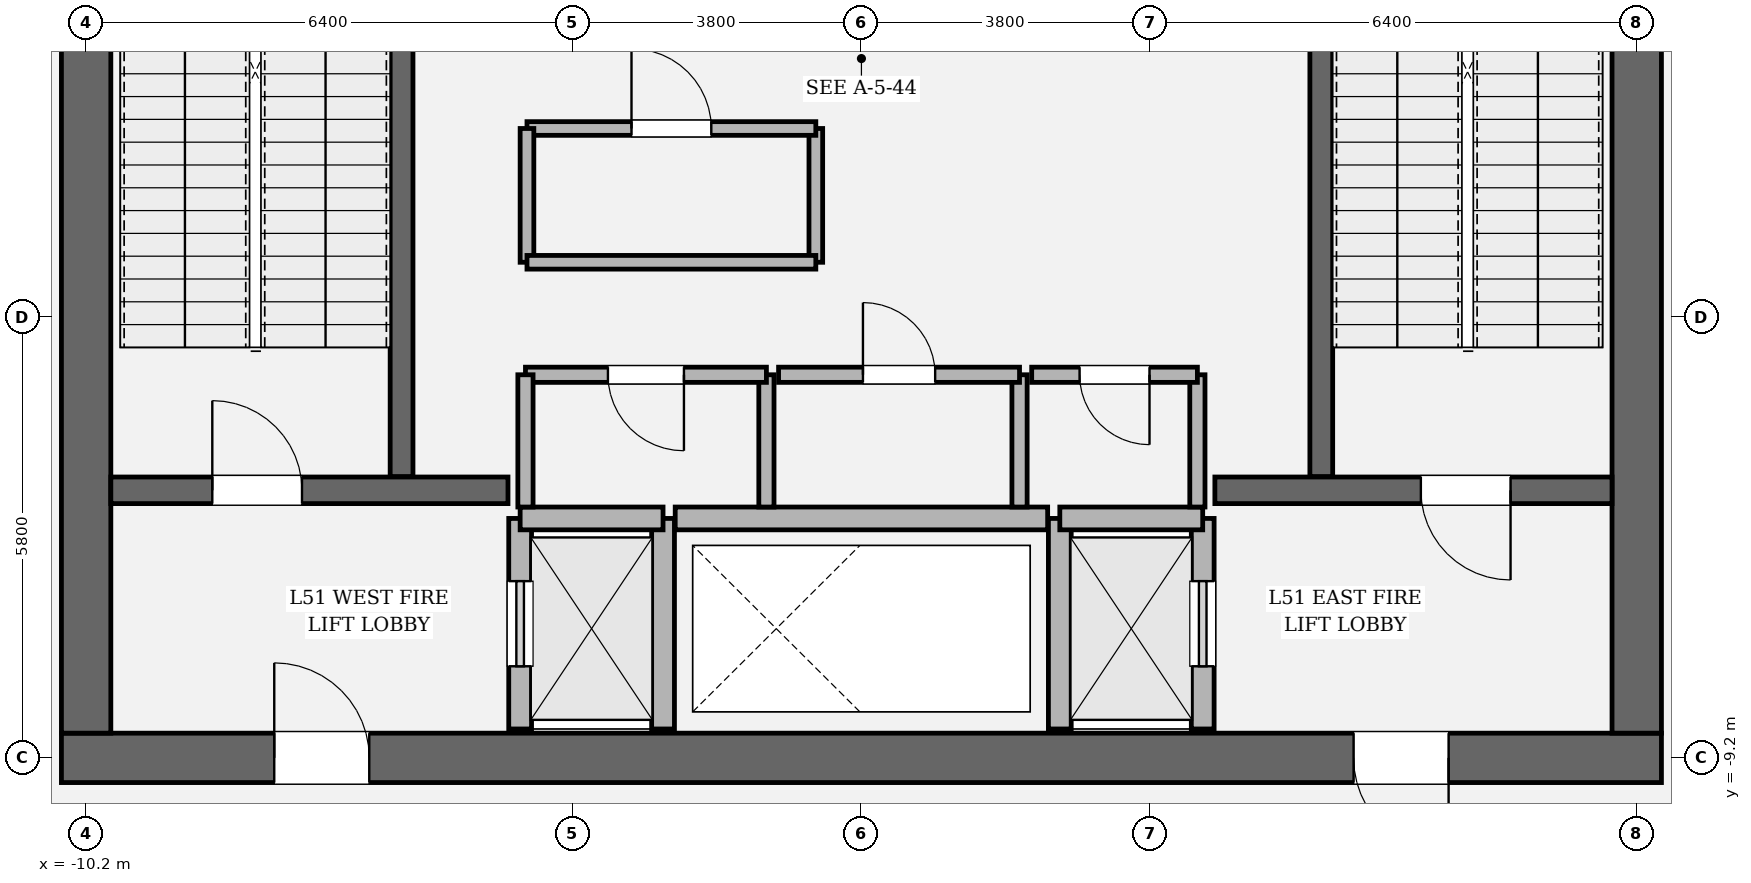
"""IFC4 building model, lengths in metres.
Left out: names, types, materials, properties, quantities, classifications, styles, units other than length and angle.
Written with IfcOpenShell. Run it as: python <this file> out.ifc"""

import sys

from ifc_helpers import new_model, si_unit, direction, frame, frame_2d, origin, place, context, subcontext, project, spatial, rectangle, extrude, element, fill, save


model = new_model("IFC4")
c1 = context("Model", 3, precision=1e-05, world=origin(), true_north=direction((0.0, 1.0)))
c2 = subcontext(c1, "Body", "Model", "MODEL_VIEW")
j1 = project(units=[si_unit("LENGTHUNIT", "METRE"), si_unit("PLANEANGLEUNIT", "RADIAN")], contexts=[c1])
p1 = place(None, origin())
s1 = spatial("IfcSite", under=j1, at=p1, CompositionType="ELEMENT")
p2 = place(p1, origin())
s2 = spatial("IfcBuilding", under=s1, at=p2, CompositionType="ELEMENT")
p3 = place(p2, frame((0.0, 0.0, 216.75)))
s3 = spatial("IfcBuildingStorey", under=s2, at=p3, CompositionType="ELEMENT", Elevation=216.75)
p4 = place(p3, frame((10.525, -9.2, 0.0), z_axis=(0.0, 0.0, 1.0), x_axis=(-1.0, 0.0, 0.0)))
e1 = element("IfcWall", 1, at=p4, inside=s3, PredefinedType="SHEAR", context=c2, shape_type="SweptSolid", body=[
    extrude(rectangle(XDim=21.05, YDim=0.65, at=frame_2d((10.525, 0.0))), origin(), (0.0, 0.0, 1.0), 4.05),
])
p5 = place(p4, frame((2.8, 0.0, 0.0)))
e2 = element("IfcOpeningElement", 2, at=p5, cuts=e1, PredefinedType="OPENING", context=c2, shape_type="SweptSolid", body=[
    extrude(rectangle(XDim=1.25, YDim=2.25, at=frame_2d((0.625, 1.125))), frame((0.0, 0.335, 0.0), z_axis=(0.0, -1.0, 0.0), x_axis=(1.0, 0.0, 0.0)), (0.0, 0.0, 1.0), 0.67),
])
p6 = place(p4, frame((17.0, 0.0, 0.0)))
e3 = element("IfcOpeningElement", 3, at=p6, cuts=e1, PredefinedType="OPENING", context=c2, shape_type="SweptSolid", body=[
    extrude(rectangle(XDim=1.25, YDim=2.25, at=frame_2d((0.625, 1.125))), frame((0.0, 0.335, 0.0), z_axis=(0.0, -1.0, 0.0), x_axis=(1.0, 0.0, 0.0)), (0.0, 0.0, 1.0), 0.67),
])
p7 = place(p3, frame((-10.2, -8.875, 0.0), z_axis=(0.0, 0.0, 1.0), x_axis=(0.0, 1.0, 0.0)))
e4 = element("IfcWall", 4, at=p7, inside=s3, PredefinedType="SHEAR", context=c2, shape_type="SweptSolid", body=[
    extrude(rectangle(XDim=17.75, YDim=0.65, at=frame_2d((8.875, 0.0))), origin(), (0.0, 0.0, 1.0), 4.05),
])
p8 = place(p7, frame((12.665, 0.0, 0.0)))
e5 = element("IfcOpeningElement", 5, at=p8, cuts=e4, PredefinedType="OPENING", context=c2, shape_type="SweptSolid", body=[
    extrude(rectangle(XDim=1.18, YDim=2.2, at=frame_2d((0.59, 1.1))), frame((0.0, 0.335, 0.0), z_axis=(0.0, -1.0, 0.0), x_axis=(1.0, 0.0, 0.0)), (0.0, 0.0, 1.0), 0.67),
])
p9 = place(p3, frame((10.2, 8.875, 0.0), z_axis=(0.0, 0.0, 1.0), x_axis=(0.0, -1.0, 0.0)))
e6 = element("IfcWall", 6, at=p9, inside=s3, PredefinedType="SHEAR", context=c2, shape_type="SweptSolid", body=[
    extrude(rectangle(XDim=17.75, YDim=0.65, at=frame_2d((8.875, 0.0))), origin(), (0.0, 0.0, 1.0), 4.05),
])
p10 = place(p9, frame((3.905, 0.0, 0.0)))
e7 = element("IfcOpeningElement", 7, at=p10, cuts=e6, PredefinedType="OPENING", context=c2, shape_type="SweptSolid", body=[
    extrude(rectangle(XDim=1.18, YDim=2.2, at=frame_2d((0.59, 1.1))), frame((0.0, 0.335, 0.0), z_axis=(0.0, -1.0, 0.0), x_axis=(1.0, 0.0, 0.0)), (0.0, 0.0, 1.0), 0.67),
])
for number, where, z_axis, x_axis in (
    (8, (-6.05, -5.5, 0.0), (0.0, 0.0, 1.0), (0.0, 1.0, 0.0)),
    (9, (6.05, 3.45, 0.0), (0.0, 0.0, 1.0), (0.0, -1.0, 0.0)),
):
    element("IfcWall", number, at=place(p3, frame(where, z_axis=z_axis, x_axis=x_axis)), inside=s3, PredefinedType="SOLIDWALL", context=c2, shape_type="SweptSolid", body=[
        extrude(rectangle(XDim=8.95, YDim=0.3, at=frame_2d((4.475, 0.0))), origin(), (0.0, 0.0, 1.0), 4.05),
    ])
p11 = place(p3, frame((-9.875, -5.68, 0.0), z_axis=(0.0, 0.0, 1.0), x_axis=(1.0, 0.0, 0.0)))
e10 = element("IfcWall", 10, at=p11, inside=s3, PredefinedType="SOLIDWALL", context=c2, shape_type="SweptSolid", body=[
    extrude(rectangle(XDim=5.225, YDim=0.35, at=frame_2d((2.613, 0.0))), origin(), (0.0, 0.0, 1.0), 4.05),
])
p12 = place(p11, frame((1.335, 0.0, 0.0)))
e11 = element("IfcOpeningElement", 11, at=p12, cuts=e10, PredefinedType="OPENING", context=c2, shape_type="SweptSolid", body=[
    extrude(rectangle(XDim=1.18, YDim=2.2, at=frame_2d((0.59, 1.1))), frame((0.0, 0.185, 0.0), z_axis=(0.0, -1.0, 0.0), x_axis=(1.0, 0.0, 0.0)), (0.0, 0.0, 1.0), 0.37),
])
p13 = place(p3, frame((4.65, -5.68, 0.0), z_axis=(0.0, 0.0, 1.0), x_axis=(1.0, 0.0, 0.0)))
e12 = element("IfcWall", 12, at=p13, inside=s3, PredefinedType="SOLIDWALL", context=c2, shape_type="SweptSolid", body=[
    extrude(rectangle(XDim=5.225, YDim=0.35, at=frame_2d((2.613, 0.0))), origin(), (0.0, 0.0, 1.0), 4.05),
])
p14 = place(p13, frame((2.71, 0.0, 0.0)))
e13 = element("IfcOpeningElement", 13, at=p14, cuts=e12, PredefinedType="OPENING", context=c2, shape_type="SweptSolid", body=[
    extrude(rectangle(XDim=1.18, YDim=2.2, at=frame_2d((0.59, 1.1))), frame((0.0, 0.185, 0.0), z_axis=(0.0, -1.0, 0.0), x_axis=(1.0, 0.0, 0.0)), (0.0, 0.0, 1.0), 0.37),
])
p15 = place(p3, frame((-4.49, -8.82, 0.0), z_axis=(0.0, 0.0, 1.0), x_axis=(0.0, 1.0, 0.0)))
e14 = element("IfcWall", 14, at=p15, inside=s3, PredefinedType="SOLIDWALL", context=c2, shape_type="SweptSolid", body=[
    extrude(rectangle(XDim=2.77, YDim=0.3, at=frame_2d((1.385, 0.0))), origin(), (0.0, 0.0, 1.0), 3.83),
])
p16 = place(p15, frame((0.825, 0.0, 0.0)))
e15 = element("IfcOpeningElement", 15, at=p16, cuts=e14, PredefinedType="OPENING", context=c2, shape_type="SweptSolid", body=[
    extrude(rectangle(XDim=1.12, YDim=2.25, at=frame_2d((0.56, 1.125))), frame((0.0, 0.16, 0.0), z_axis=(0.0, -1.0, 0.0), x_axis=(1.0, 0.0, 0.0)), (0.0, 0.0, 1.0), 0.32),
])
p17 = place(p3, frame((-2.61, -8.82, 0.0), z_axis=(0.0, 0.0, 1.0), x_axis=(0.0, 1.0, 0.0)))
e16 = element("IfcWall", 16, at=p17, inside=s3, PredefinedType="SOLIDWALL", context=c2, shape_type="SweptSolid", body=[
    extrude(rectangle(XDim=2.77, YDim=0.3, at=frame_2d((1.385, 0.0))), origin(), (0.0, 0.0, 1.0), 3.83),
])
p18 = place(p3, frame((-4.49, -6.05, 0.0), z_axis=(0.0, 0.0, 1.0), x_axis=(1.0, 0.0, 0.0)))
e17 = element("IfcWall", 17, at=p18, inside=s3, PredefinedType="SOLIDWALL", context=c2, shape_type="SweptSolid", body=[
    extrude(rectangle(XDim=1.88, YDim=0.3, at=frame_2d((0.94, 0.0))), origin(), (0.0, 0.0, 1.0), 3.83),
])
p19 = place(p3, frame((4.49, -8.82, 0.0), z_axis=(0.0, 0.0, 1.0), x_axis=(0.0, 1.0, 0.0)))
e18 = element("IfcWall", 18, at=p19, inside=s3, PredefinedType="SOLIDWALL", context=c2, shape_type="SweptSolid", body=[
    extrude(rectangle(XDim=2.77, YDim=0.3, at=frame_2d((1.385, 0.0))), origin(), (0.0, 0.0, 1.0), 3.83),
])
p20 = place(p19, frame((0.825, 0.0, 0.0)))
e19 = element("IfcOpeningElement", 19, at=p20, cuts=e18, PredefinedType="OPENING", context=c2, shape_type="SweptSolid", body=[
    extrude(rectangle(XDim=1.12, YDim=2.25, at=frame_2d((0.56, 1.125))), frame((0.0, 0.16, 0.0), z_axis=(0.0, -1.0, 0.0), x_axis=(1.0, 0.0, 0.0)), (0.0, 0.0, 1.0), 0.32),
])
p21 = place(p3, frame((2.61, -8.82, 0.0), z_axis=(0.0, 0.0, 1.0), x_axis=(0.0, 1.0, 0.0)))
e20 = element("IfcWall", 20, at=p21, inside=s3, PredefinedType="SOLIDWALL", context=c2, shape_type="SweptSolid", body=[
    extrude(rectangle(XDim=2.77, YDim=0.3, at=frame_2d((1.385, 0.0))), origin(), (0.0, 0.0, 1.0), 3.83),
])
p22 = place(p3, frame((2.61, -6.05, 0.0), z_axis=(0.0, 0.0, 1.0), x_axis=(1.0, 0.0, 0.0)))
e21 = element("IfcWall", 21, at=p22, inside=s3, PredefinedType="SOLIDWALL", context=c2, shape_type="SweptSolid", body=[
    extrude(rectangle(XDim=1.88, YDim=0.3, at=frame_2d((0.94, 0.0))), origin(), (0.0, 0.0, 1.0), 3.83),
])
p23 = place(p3, frame((-2.45, -6.05, 0.0), z_axis=(0.0, 0.0, 1.0), x_axis=(1.0, 0.0, 0.0)))
e22 = element("IfcWall", 22, at=p23, inside=s3, PredefinedType="SOLIDWALL", context=c2, shape_type="SweptSolid", body=[
    extrude(rectangle(XDim=4.9, YDim=0.3, at=frame_2d((2.45, 0.0))), origin(), (0.0, 0.0, 1.0), 3.83),
])
p24 = place(p3, frame((-1.25, -5.9, 0.0), z_axis=(0.0, 0.0, 1.0), x_axis=(0.0, 1.0, 0.0)))
e23 = element("IfcWall", 23, at=p24, inside=s3, PredefinedType="SOLIDWALL", context=c2, shape_type="SweptSolid", body=[
    extrude(rectangle(XDim=1.74, YDim=0.2, at=frame_2d((0.87, 0.0))), origin(), (0.0, 0.0, 1.0), 3.83),
])
p25 = place(p3, frame((-1.25, -4.16, 0.0), z_axis=(0.0, 0.0, 1.0), x_axis=(-1.0, 0.0, 0.0)))
e24 = element("IfcWall", 24, at=p25, inside=s3, PredefinedType="SOLIDWALL", context=c2, shape_type="SweptSolid", body=[
    extrude(rectangle(XDim=3.17, YDim=0.2, at=frame_2d((1.585, 0.0))), origin(), (0.0, 0.0, 1.0), 3.83),
])
p26 = place(p25, frame((1.085, 0.0, 0.0)))
e25 = element("IfcOpeningElement", 25, at=p26, cuts=e24, PredefinedType="OPENING", context=c2, shape_type="SweptSolid", body=[
    extrude(rectangle(XDim=1.0, YDim=2.15, at=frame_2d((0.5, 1.075))), frame((0.0, 0.11, 0.0), z_axis=(0.0, -1.0, 0.0), x_axis=(1.0, 0.0, 0.0)), (0.0, 0.0, 1.0), 0.22),
])
for number, where, z_axis, x_axis in (
    (26, (-4.42, -4.16, 0.0), (0.0, 0.0, 1.0), (0.0, -1.0, 0.0)),
    (27, (2.08, -5.9, 0.0), (0.0, 0.0, 1.0), (0.0, 1.0, 0.0)),
):
    element("IfcWall", number, at=place(p3, frame(where, z_axis=z_axis, x_axis=x_axis)), inside=s3, PredefinedType="SOLIDWALL", context=c2, shape_type="SweptSolid", body=[
        extrude(rectangle(XDim=1.74, YDim=0.2, at=frame_2d((0.87, 0.0))), origin(), (0.0, 0.0, 1.0), 3.83),
    ])
p27 = place(p3, frame((2.08, -4.16, 0.0), z_axis=(0.0, 0.0, 1.0), x_axis=(-1.0, 0.0, 0.0)))
e28 = element("IfcWall", 28, at=p27, inside=s3, PredefinedType="SOLIDWALL", context=c2, shape_type="SweptSolid", body=[
    extrude(rectangle(XDim=3.17, YDim=0.2, at=frame_2d((1.585, 0.0))), origin(), (0.0, 0.0, 1.0), 3.83),
])
p28 = place(p27, frame((1.11, 0.0, 0.0)))
e29 = element("IfcOpeningElement", 29, at=p28, cuts=e28, PredefinedType="OPENING", context=c2, shape_type="SweptSolid", body=[
    extrude(rectangle(XDim=0.95, YDim=2.15, at=frame_2d((0.475, 1.075))), frame((0.0, 0.11, 0.0), z_axis=(0.0, -1.0, 0.0), x_axis=(1.0, 0.0, 0.0)), (0.0, 0.0, 1.0), 0.22),
])
p29 = place(p3, frame((4.42, -5.9, 0.0), z_axis=(0.0, 0.0, 1.0), x_axis=(0.0, 1.0, 0.0)))
e30 = element("IfcWall", 30, at=p29, inside=s3, PredefinedType="SOLIDWALL", context=c2, shape_type="SweptSolid", body=[
    extrude(rectangle(XDim=1.74, YDim=0.2, at=frame_2d((0.87, 0.0))), origin(), (0.0, 0.0, 1.0), 3.83),
])
p30 = place(p3, frame((4.42, -4.16, 0.0), z_axis=(0.0, 0.0, 1.0), x_axis=(-1.0, 0.0, 0.0)))
e31 = element("IfcWall", 31, at=p30, inside=s3, PredefinedType="SOLIDWALL", context=c2, shape_type="SweptSolid", body=[
    extrude(rectangle(XDim=2.18, YDim=0.2, at=frame_2d((1.09, 0.0))), origin(), (0.0, 0.0, 1.0), 3.83),
])
p31 = place(p30, frame((0.63, 0.0, 0.0)))
e32 = element("IfcOpeningElement", 32, at=p31, cuts=e31, PredefinedType="OPENING", context=c2, shape_type="SweptSolid", body=[
    extrude(rectangle(XDim=0.92, YDim=2.1, at=frame_2d((0.46, 1.05))), frame((0.0, 0.11, 0.0), z_axis=(0.0, -1.0, 0.0), x_axis=(1.0, 0.0, 0.0)), (0.0, 0.0, 1.0), 0.22),
])
p32 = place(p3, frame((-0.6, -2.68, 0.0), z_axis=(0.0, 0.0, 1.0), x_axis=(0.0, 1.0, 0.0)))
e33 = element("IfcWall", 33, at=p32, inside=s3, PredefinedType="PARTITIONING", context=c2, shape_type="SweptSolid", body=[
    extrude(rectangle(XDim=1.76, YDim=0.18, at=frame_2d((0.88, 0.0))), origin(), (0.0, 0.0, 1.0), 3.83),
])
p33 = place(p3, frame((-0.6, -0.92, 0.0), z_axis=(0.0, 0.0, 1.0), x_axis=(-1.0, 0.0, 0.0)))
e34 = element("IfcWall", 34, at=p33, inside=s3, PredefinedType="PARTITIONING", context=c2, shape_type="SweptSolid", body=[
    extrude(rectangle(XDim=3.8, YDim=0.18, at=frame_2d((1.9, 0.0))), origin(), (0.0, 0.0, 1.0), 3.83),
])
p34 = place(p33, frame((1.375, 0.0, 0.0)))
e35 = element("IfcOpeningElement", 35, at=p34, cuts=e34, PredefinedType="OPENING", context=c2, shape_type="SweptSolid", body=[
    extrude(rectangle(XDim=1.05, YDim=2.2, at=frame_2d((0.525, 1.1))), frame((0.0, 0.1, 0.0), z_axis=(0.0, -1.0, 0.0), x_axis=(1.0, 0.0, 0.0)), (0.0, 0.0, 1.0), 0.2),
])
p35 = place(p3, frame((-4.4, -0.92, 0.0), z_axis=(0.0, 0.0, 1.0), x_axis=(0.0, -1.0, 0.0)))
e36 = element("IfcWall", 36, at=p35, inside=s3, PredefinedType="PARTITIONING", context=c2, shape_type="SweptSolid", body=[
    extrude(rectangle(XDim=1.76, YDim=0.18, at=frame_2d((0.88, 0.0))), origin(), (0.0, 0.0, 1.0), 3.83),
])
p36 = place(p3, frame((-4.4, -2.68, 0.0), z_axis=(0.0, 0.0, 1.0), x_axis=(1.0, 0.0, 0.0)))
e37 = element("IfcWall", 37, at=p36, inside=s3, PredefinedType="PARTITIONING", context=c2, shape_type="SweptSolid", body=[
    extrude(rectangle(XDim=3.8, YDim=0.18, at=frame_2d((1.9, 0.0))), origin(), (0.0, 0.0, 1.0), 3.83),
])
p37 = place(p12, origin())
e38 = element("IfcDoor", 38, at=p37, inside=s3, OperationType="SINGLE_SWING_LEFT", PredefinedType="DOOR", context=c2, shape_type="SweptSolid", body=[
    extrude(rectangle(XDim=1.18, YDim=2.2, at=frame_2d((0.59, 1.1))), frame((0.0, 0.025, 0.0), z_axis=(0.0, -1.0, 0.0), x_axis=(1.0, 0.0, 0.0)), (0.0, 0.0, 1.0), 0.05),
])
fill(e11, e38)
p38 = place(p14, origin())
e39 = element("IfcDoor", 39, at=p38, inside=s3, OperationType="SINGLE_SWING_RIGHT", PredefinedType="DOOR", context=c2, shape_type="SweptSolid", body=[
    extrude(rectangle(XDim=1.18, YDim=2.2, at=frame_2d((0.59, 1.1))), frame((0.0, 0.025, 0.0), z_axis=(0.0, -1.0, 0.0), x_axis=(1.0, 0.0, 0.0)), (0.0, 0.0, 1.0), 0.05),
])
fill(e13, e39)
p39 = place(p5, origin())
e40 = element("IfcDoor", 40, at=p39, inside=s3, OperationType="SINGLE_SWING_LEFT", PredefinedType="DOOR", context=c2, shape_type="SweptSolid", body=[
    extrude(rectangle(XDim=1.25, YDim=2.25, at=frame_2d((0.625, 1.125))), frame((0.0, 0.025, 0.0), z_axis=(0.0, -1.0, 0.0), x_axis=(1.0, 0.0, 0.0)), (0.0, 0.0, 1.0), 0.05),
])
fill(e2, e40)
p40 = place(p6, origin())
e41 = element("IfcDoor", 41, at=p40, inside=s3, OperationType="SINGLE_SWING_RIGHT", PredefinedType="DOOR", context=c2, shape_type="SweptSolid", body=[
    extrude(rectangle(XDim=1.25, YDim=2.25, at=frame_2d((0.625, 1.125))), frame((0.0, 0.025, 0.0), z_axis=(0.0, -1.0, 0.0), x_axis=(1.0, 0.0, 0.0)), (0.0, 0.0, 1.0), 0.05),
])
fill(e3, e41)
p41 = place(p16, origin())
e42 = element("IfcDoor", 42, at=p41, inside=s3, OperationType="SLIDING_TO_LEFT", PredefinedType="DOOR", context=c2, shape_type="SweptSolid", body=[
    extrude(rectangle(XDim=1.12, YDim=2.25, at=frame_2d((0.56, 1.125))), frame((0.0, 0.025, 0.0), z_axis=(0.0, -1.0, 0.0), x_axis=(1.0, 0.0, 0.0)), (0.0, 0.0, 1.0), 0.05),
])
fill(e15, e42)
p42 = place(p20, origin())
e43 = element("IfcDoor", 43, at=p42, inside=s3, OperationType="SLIDING_TO_RIGHT", PredefinedType="DOOR", context=c2, shape_type="SweptSolid", body=[
    extrude(rectangle(XDim=1.12, YDim=2.25, at=frame_2d((0.56, 1.125))), frame((0.0, 0.025, 0.0), z_axis=(0.0, -1.0, 0.0), x_axis=(1.0, 0.0, 0.0)), (0.0, 0.0, 1.0), 0.05),
])
fill(e19, e43)
p43 = place(p26, origin())
e44 = element("IfcDoor", 44, at=p43, inside=s3, OperationType="SINGLE_SWING_LEFT", PredefinedType="DOOR", context=c2, shape_type="SweptSolid", body=[
    extrude(rectangle(XDim=1.0, YDim=2.15, at=frame_2d((0.5, 1.075))), frame((0.0, 0.025, 0.0), z_axis=(0.0, -1.0, 0.0), x_axis=(1.0, 0.0, 0.0)), (0.0, 0.0, 1.0), 0.05),
])
fill(e25, e44)
p44 = place(p28, origin())
e45 = element("IfcDoor", 45, at=p44, inside=s3, OperationType="SINGLE_SWING_RIGHT", PredefinedType="DOOR", context=c2, shape_type="SweptSolid", body=[
    extrude(rectangle(XDim=0.95, YDim=2.15, at=frame_2d((0.475, 1.075))), frame((0.0, 0.025, 0.0), z_axis=(0.0, -1.0, 0.0), x_axis=(1.0, 0.0, 0.0)), (0.0, 0.0, 1.0), 0.05),
])
fill(e29, e45)
p45 = place(p31, origin())
e46 = element("IfcDoor", 46, at=p45, inside=s3, OperationType="SINGLE_SWING_LEFT", PredefinedType="DOOR", context=c2, shape_type="SweptSolid", body=[
    extrude(rectangle(XDim=0.92, YDim=2.1, at=frame_2d((0.46, 1.05))), frame((0.0, 0.025, 0.0), z_axis=(0.0, -1.0, 0.0), x_axis=(1.0, 0.0, 0.0)), (0.0, 0.0, 1.0), 0.05),
])
fill(e32, e46)
p46 = place(p34, origin())
e47 = element("IfcDoor", 47, at=p46, inside=s3, OperationType="SINGLE_SWING_RIGHT", PredefinedType="DOOR", context=c2, shape_type="SweptSolid", body=[
    extrude(rectangle(XDim=1.05, YDim=2.2, at=frame_2d((0.525, 1.1))), frame((0.0, 0.025, 0.0), z_axis=(0.0, -1.0, 0.0), x_axis=(1.0, 0.0, 0.0)), (0.0, 0.0, 1.0), 0.05),
])
fill(e35, e47)
save(model, sys.argv[1])
